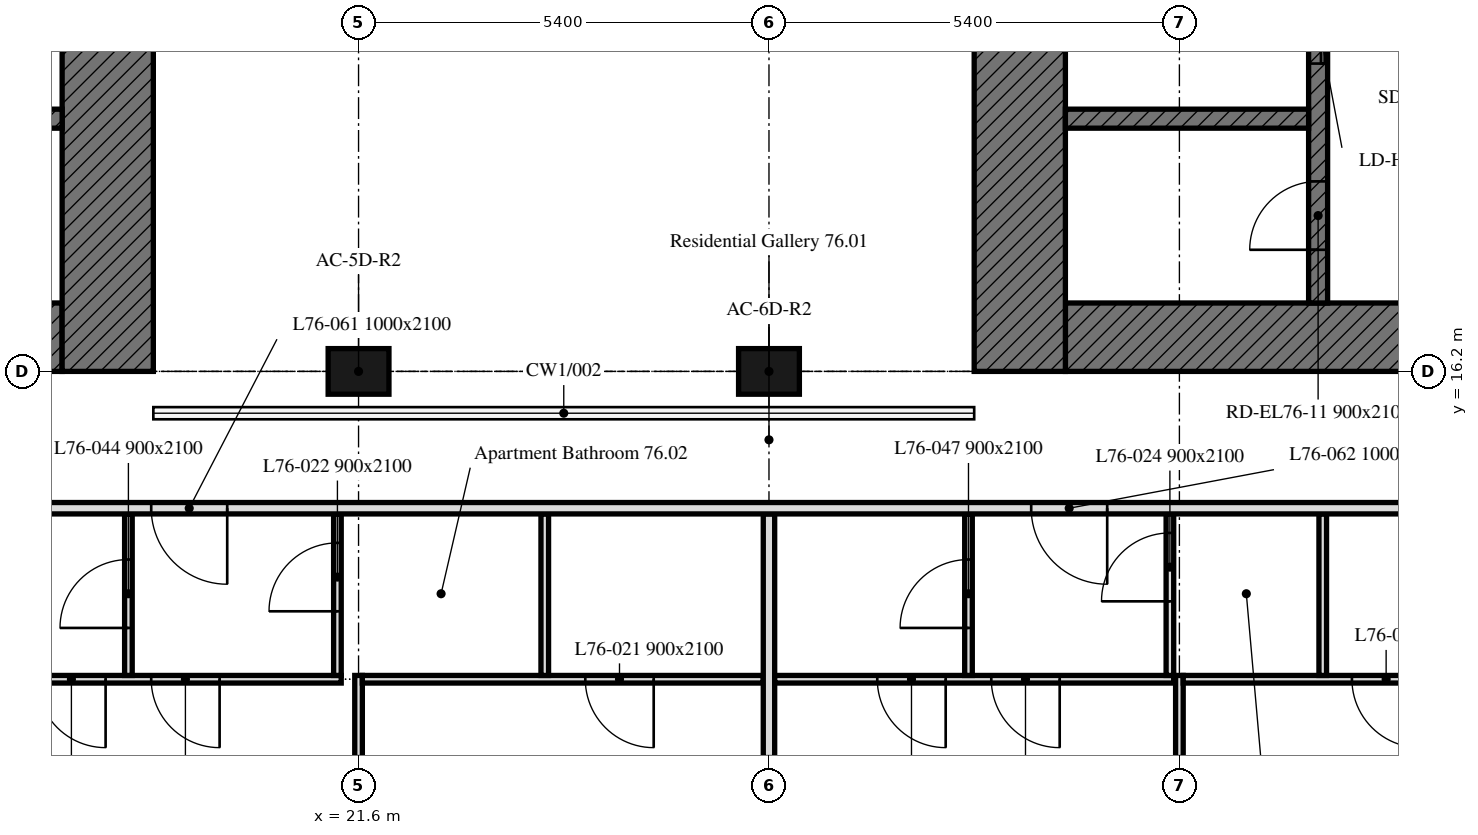
"""IFC4 building model, lengths in metres.
Left out: names, types, materials, properties, quantities, classifications, styles, units other than length and angle.
Written with IfcOpenShell. Run it as: python <this file> out.ifc"""

import sys

from ifc_helpers import new_model, si_unit, direction, frame, frame_2d, origin, origin_2d, place, context, subcontext, project, spatial, rectangle, extrude, element, fill, save


model = new_model("IFC4")
c1 = context("Model", 3, precision=1e-05, world=origin(), true_north=direction((0.0, 1.0)))
c2 = subcontext(c1, "Body", "Model", "MODEL_VIEW")
j1 = project(units=[si_unit("LENGTHUNIT", "METRE"), si_unit("PLANEANGLEUNIT", "RADIAN")], contexts=[c1])
p1 = place(None, origin())
s1 = spatial("IfcSite", under=j1, at=p1, CompositionType="ELEMENT")
p2 = place(p1, origin())
s2 = spatial("IfcBuilding", under=s1, at=p2, CompositionType="ELEMENT")
p3 = place(p2, frame((0.0, 0.0, 304.9)))
s3 = spatial("IfcBuildingStorey", under=s2, at=p3, CompositionType="ELEMENT", Elevation=304.9)
for number, where, z_axis, x_axis in (
    (1, (21.6, 16.2, 0.0), (0.0, 0.0, 1.0), (1.0, 0.0, 0.0)),
    (2, (27.0, 16.2, 0.0), (0.0, 0.0, 1.0), (1.0, 0.0, 0.0)),
):
    element("IfcColumn", number, at=place(p3, frame(where, z_axis=z_axis, x_axis=x_axis)), inside=s3, PredefinedType="COLUMN", context=c2, shape_type="SweptSolid", body=[
        extrude(rectangle(XDim=0.8, YDim=0.6, at=origin_2d()), origin(), (0.0, 0.0, 1.0), 2.8),
    ])
p4 = place(p3, frame((17.7, 16.65, 0.0), z_axis=(0.0, 0.0, 1.0), x_axis=(-1.0, 0.0, 0.0)))
e3 = element("IfcWall", 3, at=p4, inside=s3, PredefinedType="SOLIDWALL", context=c2, shape_type="SweptSolid", body=[
    extrude(rectangle(XDim=11.1, YDim=0.9, at=frame_2d((5.55, 0.0))), origin(), (0.0, 0.0, 1.0), 2.8),
])
p5 = place(p4, frame((5.55, 0.0, 0.0)))
e4 = element("IfcOpeningElement", 4, at=p5, cuts=e3, PredefinedType="OPENING", context=c2, shape_type="SweptSolid", body=[
    extrude(rectangle(XDim=2.0, YDim=2.4, at=frame_2d((1.0, 1.2))), frame((0.0, 0.45, 0.0), z_axis=(0.0, -1.0, 0.0), x_axis=(1.0, 0.0, 0.0)), (0.0, 0.0, 1.0), 0.9),
])
p6 = place(p3, frame((18.3, 32.4, 0.0), z_axis=(0.0, 0.0, 1.0), x_axis=(0.0, -1.0, 0.0)))
e5 = element("IfcWall", 5, at=p6, inside=s3, PredefinedType="SOLIDWALL", context=c2, shape_type="SweptSolid", body=[
    extrude(rectangle(XDim=16.2, YDim=1.2, at=frame_2d((8.1, 0.0))), origin(), (0.0, 0.0, 1.0), 2.8),
])
p7 = place(p3, frame((14.5, 19.525, 0.0), z_axis=(0.0, 0.0, 1.0), x_axis=(1.0, 0.0, 0.0)))
e6 = element("IfcWall", 6, at=p7, inside=s3, PredefinedType="SOLIDWALL", context=c2, shape_type="SweptSolid", body=[
    extrude(rectangle(XDim=3.2, YDim=0.25, at=frame_2d((1.6, 0.0))), origin(), (0.0, 0.0, 1.0), 2.8),
])
p8 = place(p3, frame((42.0, 16.65, 0.0), z_axis=(0.0, 0.0, 1.0), x_axis=(-1.0, 0.0, 0.0)))
e7 = element("IfcWall", 7, at=p8, inside=s3, PredefinedType="SOLIDWALL", context=c2, shape_type="SweptSolid", body=[
    extrude(rectangle(XDim=11.1, YDim=0.9, at=frame_2d((5.55, 0.0))), origin(), (0.0, 0.0, 1.0), 2.8),
])
p9 = place(p8, frame((3.55, 0.0, 0.0)))
e8 = element("IfcOpeningElement", 8, at=p9, cuts=e7, PredefinedType="OPENING", context=c2, shape_type="SweptSolid", body=[
    extrude(rectangle(XDim=2.0, YDim=2.4, at=frame_2d((1.0, 1.2))), frame((0.0, 0.45, 0.0), z_axis=(0.0, -1.0, 0.0), x_axis=(1.0, 0.0, 0.0)), (0.0, 0.0, 1.0), 0.9),
])
p10 = place(p3, frame((30.3, 16.2, 0.0), z_axis=(0.0, 0.0, 1.0), x_axis=(0.0, 1.0, 0.0)))
e9 = element("IfcWall", 9, at=p10, inside=s3, PredefinedType="SOLIDWALL", context=c2, shape_type="SweptSolid", body=[
    extrude(rectangle(XDim=16.2, YDim=1.2, at=frame_2d((8.1, 0.0))), origin(), (0.0, 0.0, 1.0), 2.8),
])
p11 = place(p3, frame((34.225, 17.1, 0.0), z_axis=(0.0, 0.0, 1.0), x_axis=(0.0, 1.0, 0.0)))
e10 = element("IfcWall", 10, at=p11, inside=s3, PredefinedType="SOLIDWALL", context=c2, shape_type="SweptSolid", body=[
    extrude(rectangle(XDim=14.4, YDim=0.25, at=frame_2d((7.2, 0.0))), origin(), (0.0, 0.0, 1.0), 2.8),
])
p12 = place(p11, frame((13.15, 0.0, 0.0)))
e11 = element("IfcOpeningElement", 11, at=p12, cuts=e10, PredefinedType="OPENING", context=c2, shape_type="SweptSolid", body=[
    extrude(rectangle(XDim=1.0, YDim=2.1, at=frame_2d((0.5, 1.05))), frame((0.0, 0.125, 0.0), z_axis=(0.0, -1.0, 0.0), x_axis=(1.0, 0.0, 0.0)), (0.0, 0.0, 1.0), 0.25),
])
p13 = place(p11, frame((3.15, 0.0, 0.0)))
e12 = element("IfcOpeningElement", 12, at=p13, cuts=e10, PredefinedType="OPENING", context=c2, shape_type="SweptSolid", body=[
    extrude(rectangle(XDim=1.1, YDim=2.1, at=frame_2d((0.55, 1.05))), frame((0.0, 0.125, 0.0), z_axis=(0.0, -1.0, 0.0), x_axis=(1.0, 0.0, 0.0)), (0.0, 0.0, 1.0), 0.25),
])
p14 = place(p11, frame((0.7, 0.0, 0.0)))
e13 = element("IfcOpeningElement", 13, at=p14, cuts=e10, PredefinedType="OPENING", context=c2, shape_type="SweptSolid", body=[
    extrude(rectangle(XDim=0.9, YDim=2.1, at=frame_2d((0.45, 1.05))), frame((0.0, 0.125, 0.0), z_axis=(0.0, -1.0, 0.0), x_axis=(1.0, 0.0, 0.0)), (0.0, 0.0, 1.0), 0.25),
])
p15 = place(p11, frame((6.175, 0.0, 0.0)))
e14 = element("IfcOpeningElement", 14, at=p15, cuts=e10, PredefinedType="OPENING", context=c2, shape_type="SweptSolid", body=[
    extrude(rectangle(XDim=0.9, YDim=2.1, at=frame_2d((0.45, 1.05))), frame((0.0, 0.125, 0.0), z_axis=(0.0, -1.0, 0.0), x_axis=(1.0, 0.0, 0.0)), (0.0, 0.0, 1.0), 0.25),
])
p16 = place(p3, frame((30.9, 19.525, 0.0), z_axis=(0.0, 0.0, 1.0), x_axis=(1.0, 0.0, 0.0)))
e15 = element("IfcWall", 15, at=p16, inside=s3, PredefinedType="SOLIDWALL", context=c2, shape_type="SweptSolid", body=[
    extrude(rectangle(XDim=3.2, YDim=0.25, at=frame_2d((1.6, 0.0))), origin(), (0.0, 0.0, 1.0), 2.8),
])
p17 = place(p3, frame((21.6, 11.12, 0.0), z_axis=(0.0, 0.0, 1.0), x_axis=(0.0, 1.0, 0.0)))
e16 = element("IfcWall", 16, at=p17, inside=s3, PredefinedType="PARTITIONING", context=c2, shape_type="SweptSolid", body=[
    extrude(rectangle(XDim=1.08, YDim=0.1, at=frame_2d((0.54, 0.0))), origin(), (0.0, 0.0, 1.0), 2.8),
])
p18 = place(p3, frame((21.372, 12.15, 0.0), z_axis=(0.0, 0.0, 1.0), x_axis=(-1.0, 0.0, 0.0)))
e17 = element("IfcWall", 17, at=p18, inside=s3, PredefinedType="PARTITIONING", context=c2, shape_type="SweptSolid", body=[
    extrude(rectangle(XDim=5.097, YDim=0.1, at=frame_2d((2.549, 0.0))), origin(), (0.0, 0.0, 1.0), 2.8),
])
p19 = place(p18, frame((3.1, 0.0, 0.0)))
e18 = element("IfcOpeningElement", 18, at=p19, cuts=e17, PredefinedType="OPENING", context=c2, shape_type="SweptSolid", body=[
    extrude(rectangle(XDim=0.9, YDim=2.1, at=frame_2d((0.45, 1.05))), frame((0.0, 0.05, 0.0), z_axis=(0.0, -1.0, 0.0), x_axis=(1.0, 0.0, 0.0)), (0.0, 0.0, 1.0), 0.1),
])
p20 = place(p18, frame((1.6, 0.0, 0.0)))
e19 = element("IfcOpeningElement", 19, at=p20, cuts=e17, PredefinedType="OPENING", context=c2, shape_type="SweptSolid", body=[
    extrude(rectangle(XDim=0.9, YDim=2.1, at=frame_2d((0.45, 1.05))), frame((0.0, 0.05, 0.0), z_axis=(0.0, -1.0, 0.0), x_axis=(1.0, 0.0, 0.0)), (0.0, 0.0, 1.0), 0.1),
])
p21 = place(p3, frame((26.925, 12.15, 0.0), z_axis=(0.0, 0.0, 1.0), x_axis=(-1.0, 0.0, 0.0)))
e20 = element("IfcWall", 20, at=p21, inside=s3, PredefinedType="PARTITIONING", context=c2, shape_type="SweptSolid", body=[
    extrude(rectangle(XDim=5.275, YDim=0.1, at=frame_2d((2.638, 0.0))), origin(), (0.0, 0.0, 1.0), 2.8),
])
p22 = place(p21, frame((1.442, 0.0, 0.0)))
e21 = element("IfcOpeningElement", 21, at=p22, cuts=e20, PredefinedType="OPENING", context=c2, shape_type="SweptSolid", body=[
    extrude(rectangle(XDim=0.9, YDim=2.1, at=frame_2d((0.45, 1.05))), frame((0.0, 0.05, 0.0), z_axis=(0.0, -1.0, 0.0), x_axis=(1.0, 0.0, 0.0)), (0.0, 0.0, 1.0), 0.1),
])
p23 = place(p3, frame((18.572, 12.2, 0.0), z_axis=(0.0, 0.0, 1.0), x_axis=(0.0, 1.0, 0.0)))
e22 = element("IfcWall", 22, at=p23, inside=s3, PredefinedType="PARTITIONING", context=c2, shape_type="SweptSolid", body=[
    extrude(rectangle(XDim=2.125, YDim=0.1, at=frame_2d((1.062, 0.0))), origin(), (0.0, 0.0, 1.0), 2.8),
])
p24 = place(p23, frame((0.625, 0.0, 0.0)))
e23 = element("IfcOpeningElement", 23, at=p24, cuts=e22, PredefinedType="OPENING", context=c2, shape_type="SweptSolid", body=[
    extrude(rectangle(XDim=0.9, YDim=2.1, at=frame_2d((0.45, 1.05))), frame((0.0, 0.05, 0.0), z_axis=(0.0, -1.0, 0.0), x_axis=(1.0, 0.0, 0.0)), (0.0, 0.0, 1.0), 0.1),
])
p25 = place(p3, frame((21.322, 12.2, 0.0), z_axis=(0.0, 0.0, 1.0), x_axis=(0.0, 1.0, 0.0)))
e24 = element("IfcWall", 24, at=p25, inside=s3, PredefinedType="PARTITIONING", context=c2, shape_type="SweptSolid", body=[
    extrude(rectangle(XDim=2.125, YDim=0.1, at=frame_2d((1.062, 0.0))), origin(), (0.0, 0.0, 1.0), 2.8),
])
p26 = place(p25, frame((0.844, 0.0, 0.0)))
e25 = element("IfcOpeningElement", 25, at=p26, cuts=e24, PredefinedType="OPENING", context=c2, shape_type="SweptSolid", body=[
    extrude(rectangle(XDim=0.9, YDim=2.1, at=frame_2d((0.45, 1.05))), frame((0.0, 0.05, 0.0), z_axis=(0.0, -1.0, 0.0), x_axis=(1.0, 0.0, 0.0)), (0.0, 0.0, 1.0), 0.1),
])
p27 = place(p3, frame((24.05, 12.2, 0.0), z_axis=(0.0, 0.0, 1.0), x_axis=(0.0, 1.0, 0.0)))
e26 = element("IfcWall", 26, at=p27, inside=s3, PredefinedType="PARTITIONING", context=c2, shape_type="SweptSolid", body=[
    extrude(rectangle(XDim=2.125, YDim=0.1, at=frame_2d((1.062, 0.0))), origin(), (0.0, 0.0, 1.0), 2.8),
])
p28 = place(p3, frame((27.0, 11.12, 0.0), z_axis=(0.0, 0.0, 1.0), x_axis=(0.0, 1.0, 0.0)))
e27 = element("IfcWall", 27, at=p28, inside=s3, PredefinedType="PARTITIONING", context=c2, shape_type="SweptSolid", body=[
    extrude(rectangle(XDim=3.205, YDim=0.15, at=frame_2d((1.603, 0.0))), origin(), (0.0, 0.0, 1.0), 2.8),
])
p29 = place(p3, frame((32.4, 11.12, 0.0), z_axis=(0.0, 0.0, 1.0), x_axis=(0.0, 1.0, 0.0)))
e28 = element("IfcWall", 28, at=p29, inside=s3, PredefinedType="PARTITIONING", context=c2, shape_type="SweptSolid", body=[
    extrude(rectangle(XDim=1.08, YDim=0.1, at=frame_2d((0.54, 0.0))), origin(), (0.0, 0.0, 1.0), 2.8),
])
p30 = place(p3, frame((32.325, 12.15, 0.0), z_axis=(0.0, 0.0, 1.0), x_axis=(-1.0, 0.0, 0.0)))
e29 = element("IfcWall", 29, at=p30, inside=s3, PredefinedType="PARTITIONING", context=c2, shape_type="SweptSolid", body=[
    extrude(rectangle(XDim=5.25, YDim=0.1, at=frame_2d((2.625, 0.0))), origin(), (0.0, 0.0, 1.0), 2.8),
])
p31 = place(p30, frame((3.0, 0.0, 0.0)))
e30 = element("IfcOpeningElement", 30, at=p31, cuts=e29, PredefinedType="OPENING", context=c2, shape_type="SweptSolid", body=[
    extrude(rectangle(XDim=0.9, YDim=2.1, at=frame_2d((0.45, 1.05))), frame((0.0, 0.05, 0.0), z_axis=(0.0, -1.0, 0.0), x_axis=(1.0, 0.0, 0.0)), (0.0, 0.0, 1.0), 0.1),
])
p32 = place(p30, frame((1.5, 0.0, 0.0)))
e31 = element("IfcOpeningElement", 31, at=p32, cuts=e29, PredefinedType="OPENING", context=c2, shape_type="SweptSolid", body=[
    extrude(rectangle(XDim=0.9, YDim=2.1, at=frame_2d((0.45, 1.05))), frame((0.0, 0.05, 0.0), z_axis=(0.0, -1.0, 0.0), x_axis=(1.0, 0.0, 0.0)), (0.0, 0.0, 1.0), 0.1),
])
p33 = place(p3, frame((37.725, 12.15, 0.0), z_axis=(0.0, 0.0, 1.0), x_axis=(-1.0, 0.0, 0.0)))
e32 = element("IfcWall", 32, at=p33, inside=s3, PredefinedType="PARTITIONING", context=c2, shape_type="SweptSolid", body=[
    extrude(rectangle(XDim=5.275, YDim=0.1, at=frame_2d((2.638, 0.0))), origin(), (0.0, 0.0, 1.0), 2.8),
])
p34 = place(p33, frame((2.155, 0.0, 0.0)))
e33 = element("IfcOpeningElement", 33, at=p34, cuts=e32, PredefinedType="OPENING", context=c2, shape_type="SweptSolid", body=[
    extrude(rectangle(XDim=0.9, YDim=2.1, at=frame_2d((0.45, 1.05))), frame((0.0, 0.05, 0.0), z_axis=(0.0, -1.0, 0.0), x_axis=(1.0, 0.0, 0.0)), (0.0, 0.0, 1.0), 0.1),
])
p35 = place(p3, frame((29.625, 12.2, 0.0), z_axis=(0.0, 0.0, 1.0), x_axis=(0.0, 1.0, 0.0)))
e34 = element("IfcWall", 34, at=p35, inside=s3, PredefinedType="PARTITIONING", context=c2, shape_type="SweptSolid", body=[
    extrude(rectangle(XDim=2.125, YDim=0.1, at=frame_2d((1.062, 0.0))), origin(), (0.0, 0.0, 1.0), 2.8),
])
p36 = place(p35, frame((0.625, 0.0, 0.0)))
e35 = element("IfcOpeningElement", 35, at=p36, cuts=e34, PredefinedType="OPENING", context=c2, shape_type="SweptSolid", body=[
    extrude(rectangle(XDim=0.9, YDim=2.1, at=frame_2d((0.45, 1.05))), frame((0.0, 0.05, 0.0), z_axis=(0.0, -1.0, 0.0), x_axis=(1.0, 0.0, 0.0)), (0.0, 0.0, 1.0), 0.1),
])
p37 = place(p3, frame((32.275, 12.2, 0.0), z_axis=(0.0, 0.0, 1.0), x_axis=(0.0, 1.0, 0.0)))
e36 = element("IfcWall", 36, at=p37, inside=s3, PredefinedType="PARTITIONING", context=c2, shape_type="SweptSolid", body=[
    extrude(rectangle(XDim=2.125, YDim=0.1, at=frame_2d((1.062, 0.0))), origin(), (0.0, 0.0, 1.0), 2.8),
])
p38 = place(p37, frame((0.975, 0.0, 0.0)))
e37 = element("IfcOpeningElement", 37, at=p38, cuts=e36, PredefinedType="OPENING", context=c2, shape_type="SweptSolid", body=[
    extrude(rectangle(XDim=0.9, YDim=2.1, at=frame_2d((0.45, 1.05))), frame((0.0, 0.05, 0.0), z_axis=(0.0, -1.0, 0.0), x_axis=(1.0, 0.0, 0.0)), (0.0, 0.0, 1.0), 0.1),
])
p39 = place(p3, frame((34.286, 12.2, 0.0), z_axis=(0.0, 0.0, 1.0), x_axis=(0.0, 1.0, 0.0)))
e38 = element("IfcWall", 38, at=p39, inside=s3, PredefinedType="PARTITIONING", context=c2, shape_type="SweptSolid", body=[
    extrude(rectangle(XDim=2.125, YDim=0.1, at=frame_2d((1.062, 0.0))), origin(), (0.0, 0.0, 1.0), 2.8),
])
p40 = place(p3, frame((47.849, 14.4, 0.0), z_axis=(0.0, 0.0, 1.0), x_axis=(-1.0, 0.0, 0.0)))
e39 = element("IfcWall", 39, at=p40, inside=s3, PredefinedType="PARTITIONING", context=c2, shape_type="SweptSolid", body=[
    extrude(rectangle(XDim=41.698, YDim=0.15, at=frame_2d((20.849, 0.0))), origin(), (0.0, 0.0, 1.0), 2.8),
])
p41 = place(p40, frame((38.179, 0.0, 0.0)))
e40 = element("IfcOpeningElement", 40, at=p41, cuts=e39, PredefinedType="OPENING", context=c2, shape_type="SweptSolid", body=[
    extrude(rectangle(XDim=1.0, YDim=2.1, at=frame_2d((0.5, 1.05))), frame((0.0, 0.075, 0.0), z_axis=(0.0, -1.0, 0.0), x_axis=(1.0, 0.0, 0.0)), (0.0, 0.0, 1.0), 0.15),
])
p42 = place(p40, frame((27.977, 0.0, 0.0)))
e41 = element("IfcOpeningElement", 41, at=p42, cuts=e39, PredefinedType="OPENING", context=c2, shape_type="SweptSolid", body=[
    extrude(rectangle(XDim=1.0, YDim=2.1, at=frame_2d((0.5, 1.05))), frame((0.0, 0.075, 0.0), z_axis=(0.0, -1.0, 0.0), x_axis=(1.0, 0.0, 0.0)), (0.0, 0.0, 1.0), 0.15),
])
p43 = place(p40, frame((16.399, 0.0, 0.0)))
e42 = element("IfcOpeningElement", 42, at=p43, cuts=e39, PredefinedType="OPENING", context=c2, shape_type="SweptSolid", body=[
    extrude(rectangle(XDim=1.0, YDim=2.1, at=frame_2d((0.5, 1.05))), frame((0.0, 0.075, 0.0), z_axis=(0.0, -1.0, 0.0), x_axis=(1.0, 0.0, 0.0)), (0.0, 0.0, 1.0), 0.15),
])
p44 = place(p40, frame((5.476, 0.0, 0.0)))
e43 = element("IfcOpeningElement", 43, at=p44, cuts=e39, PredefinedType="OPENING", context=c2, shape_type="SweptSolid", body=[
    extrude(rectangle(XDim=1.0, YDim=2.1, at=frame_2d((0.5, 1.05))), frame((0.0, 0.075, 0.0), z_axis=(0.0, -1.0, 0.0), x_axis=(1.0, 0.0, 0.0)), (0.0, 0.0, 1.0), 0.15),
])
p45 = place(p13, origin())
e44 = element("IfcDoor", 44, at=p45, inside=s3, OperationType="DOUBLE_DOOR_SLIDING", PredefinedType="DOOR", context=c2, shape_type="SweptSolid", body=[
    extrude(rectangle(XDim=1.1, YDim=2.1, at=frame_2d((0.55, 1.05))), frame((0.0, 0.025, 0.0), z_axis=(0.0, -1.0, 0.0), x_axis=(1.0, 0.0, 0.0)), (0.0, 0.0, 1.0), 0.05),
])
fill(e12, e44)
p46 = place(p14, origin())
e45 = element("IfcDoor", 45, at=p46, inside=s3, OperationType="SINGLE_SWING_LEFT", PredefinedType="DOOR", context=c2, shape_type="SweptSolid", body=[
    extrude(rectangle(XDim=0.9, YDim=2.1, at=frame_2d((0.45, 1.05))), frame((0.0, 0.025, 0.0), z_axis=(0.0, -1.0, 0.0), x_axis=(1.0, 0.0, 0.0)), (0.0, 0.0, 1.0), 0.05),
])
fill(e13, e45)
p47 = place(p22, origin())
e46 = element("IfcDoor", 46, at=p47, inside=s3, OperationType="SINGLE_SWING_LEFT", PredefinedType="DOOR", context=c2, shape_type="SweptSolid", body=[
    extrude(rectangle(XDim=0.9, YDim=2.1, at=frame_2d((0.45, 1.05))), frame((0.0, 0.025, 0.0), z_axis=(0.0, -1.0, 0.0), x_axis=(1.0, 0.0, 0.0)), (0.0, 0.0, 1.0), 0.05),
])
fill(e21, e46)
p48 = place(p26, origin())
e47 = element("IfcDoor", 47, at=p48, inside=s3, OperationType="SINGLE_SWING_LEFT", PredefinedType="DOOR", context=c2, shape_type="SweptSolid", body=[
    extrude(rectangle(XDim=0.9, YDim=2.1, at=frame_2d((0.45, 1.05))), frame((0.0, 0.025, 0.0), z_axis=(0.0, -1.0, 0.0), x_axis=(1.0, 0.0, 0.0)), (0.0, 0.0, 1.0), 0.05),
])
fill(e25, e47)
p49 = place(p34, origin())
e48 = element("IfcDoor", 48, at=p49, inside=s3, OperationType="SINGLE_SWING_LEFT", PredefinedType="DOOR", context=c2, shape_type="SweptSolid", body=[
    extrude(rectangle(XDim=0.9, YDim=2.1, at=frame_2d((0.45, 1.05))), frame((0.0, 0.025, 0.0), z_axis=(0.0, -1.0, 0.0), x_axis=(1.0, 0.0, 0.0)), (0.0, 0.0, 1.0), 0.05),
])
fill(e33, e48)
p50 = place(p38, origin())
e49 = element("IfcDoor", 49, at=p50, inside=s3, OperationType="SINGLE_SWING_RIGHT", PredefinedType="DOOR", context=c2, shape_type="SweptSolid", body=[
    extrude(rectangle(XDim=0.9, YDim=2.1, at=frame_2d((0.45, 1.05))), frame((0.0, 0.025, 0.0), z_axis=(0.0, -1.0, 0.0), x_axis=(1.0, 0.0, 0.0)), (0.0, 0.0, 1.0), 0.05),
])
fill(e37, e49)
p51 = place(p19, origin())
e50 = element("IfcDoor", 50, at=p51, inside=s3, OperationType="SINGLE_SWING_RIGHT", PredefinedType="DOOR", context=c2, shape_type="SweptSolid", body=[
    extrude(rectangle(XDim=0.9, YDim=2.1, at=frame_2d((0.45, 1.05))), frame((0.0, 0.025, 0.0), z_axis=(0.0, -1.0, 0.0), x_axis=(1.0, 0.0, 0.0)), (0.0, 0.0, 1.0), 0.05),
])
fill(e18, e50)
p52 = place(p24, origin())
e51 = element("IfcDoor", 51, at=p52, inside=s3, OperationType="SINGLE_SWING_LEFT", PredefinedType="DOOR", context=c2, shape_type="SweptSolid", body=[
    extrude(rectangle(XDim=0.9, YDim=2.1, at=frame_2d((0.45, 1.05))), frame((0.0, 0.025, 0.0), z_axis=(0.0, -1.0, 0.0), x_axis=(1.0, 0.0, 0.0)), (0.0, 0.0, 1.0), 0.05),
])
fill(e23, e51)
p53 = place(p31, origin())
e52 = element("IfcDoor", 52, at=p53, inside=s3, OperationType="SINGLE_SWING_RIGHT", PredefinedType="DOOR", context=c2, shape_type="SweptSolid", body=[
    extrude(rectangle(XDim=0.9, YDim=2.1, at=frame_2d((0.45, 1.05))), frame((0.0, 0.025, 0.0), z_axis=(0.0, -1.0, 0.0), x_axis=(1.0, 0.0, 0.0)), (0.0, 0.0, 1.0), 0.05),
])
fill(e30, e52)
p54 = place(p36, origin())
e53 = element("IfcDoor", 53, at=p54, inside=s3, OperationType="SINGLE_SWING_RIGHT", PredefinedType="DOOR", context=c2, shape_type="SweptSolid", body=[
    extrude(rectangle(XDim=0.9, YDim=2.1, at=frame_2d((0.45, 1.05))), frame((0.0, 0.025, 0.0), z_axis=(0.0, -1.0, 0.0), x_axis=(1.0, 0.0, 0.0)), (0.0, 0.0, 1.0), 0.05),
])
fill(e35, e53)
p55 = place(p20, origin())
e54 = element("IfcDoor", 54, at=p55, inside=s3, OperationType="SINGLE_SWING_LEFT", PredefinedType="DOOR", context=c2, shape_type="SweptSolid", body=[
    extrude(rectangle(XDim=0.9, YDim=2.1, at=frame_2d((0.45, 1.05))), frame((0.0, 0.025, 0.0), z_axis=(0.0, -1.0, 0.0), x_axis=(1.0, 0.0, 0.0)), (0.0, 0.0, 1.0), 0.05),
])
fill(e19, e54)
p56 = place(p32, origin())
e55 = element("IfcDoor", 55, at=p56, inside=s3, OperationType="SINGLE_SWING_LEFT", PredefinedType="DOOR", context=c2, shape_type="SweptSolid", body=[
    extrude(rectangle(XDim=0.9, YDim=2.1, at=frame_2d((0.45, 1.05))), frame((0.0, 0.025, 0.0), z_axis=(0.0, -1.0, 0.0), x_axis=(1.0, 0.0, 0.0)), (0.0, 0.0, 1.0), 0.05),
])
fill(e31, e55)
p57 = place(p42, origin())
e56 = element("IfcDoor", 56, at=p57, inside=s3, OperationType="SINGLE_SWING_RIGHT", PredefinedType="DOOR", context=c2, shape_type="SweptSolid", body=[
    extrude(rectangle(XDim=1.0, YDim=2.1, at=frame_2d((0.5, 1.05))), frame((0.0, 0.025, 0.0), z_axis=(0.0, -1.0, 0.0), x_axis=(1.0, 0.0, 0.0)), (0.0, 0.0, 1.0), 0.05),
])
fill(e41, e56)
p58 = place(p43, origin())
e57 = element("IfcDoor", 57, at=p58, inside=s3, OperationType="SINGLE_SWING_LEFT", PredefinedType="DOOR", context=c2, shape_type="SweptSolid", body=[
    extrude(rectangle(XDim=1.0, YDim=2.1, at=frame_2d((0.5, 1.05))), frame((0.0, 0.025, 0.0), z_axis=(0.0, -1.0, 0.0), x_axis=(1.0, 0.0, 0.0)), (0.0, 0.0, 1.0), 0.05),
])
fill(e42, e57)
save(model, sys.argv[1])
